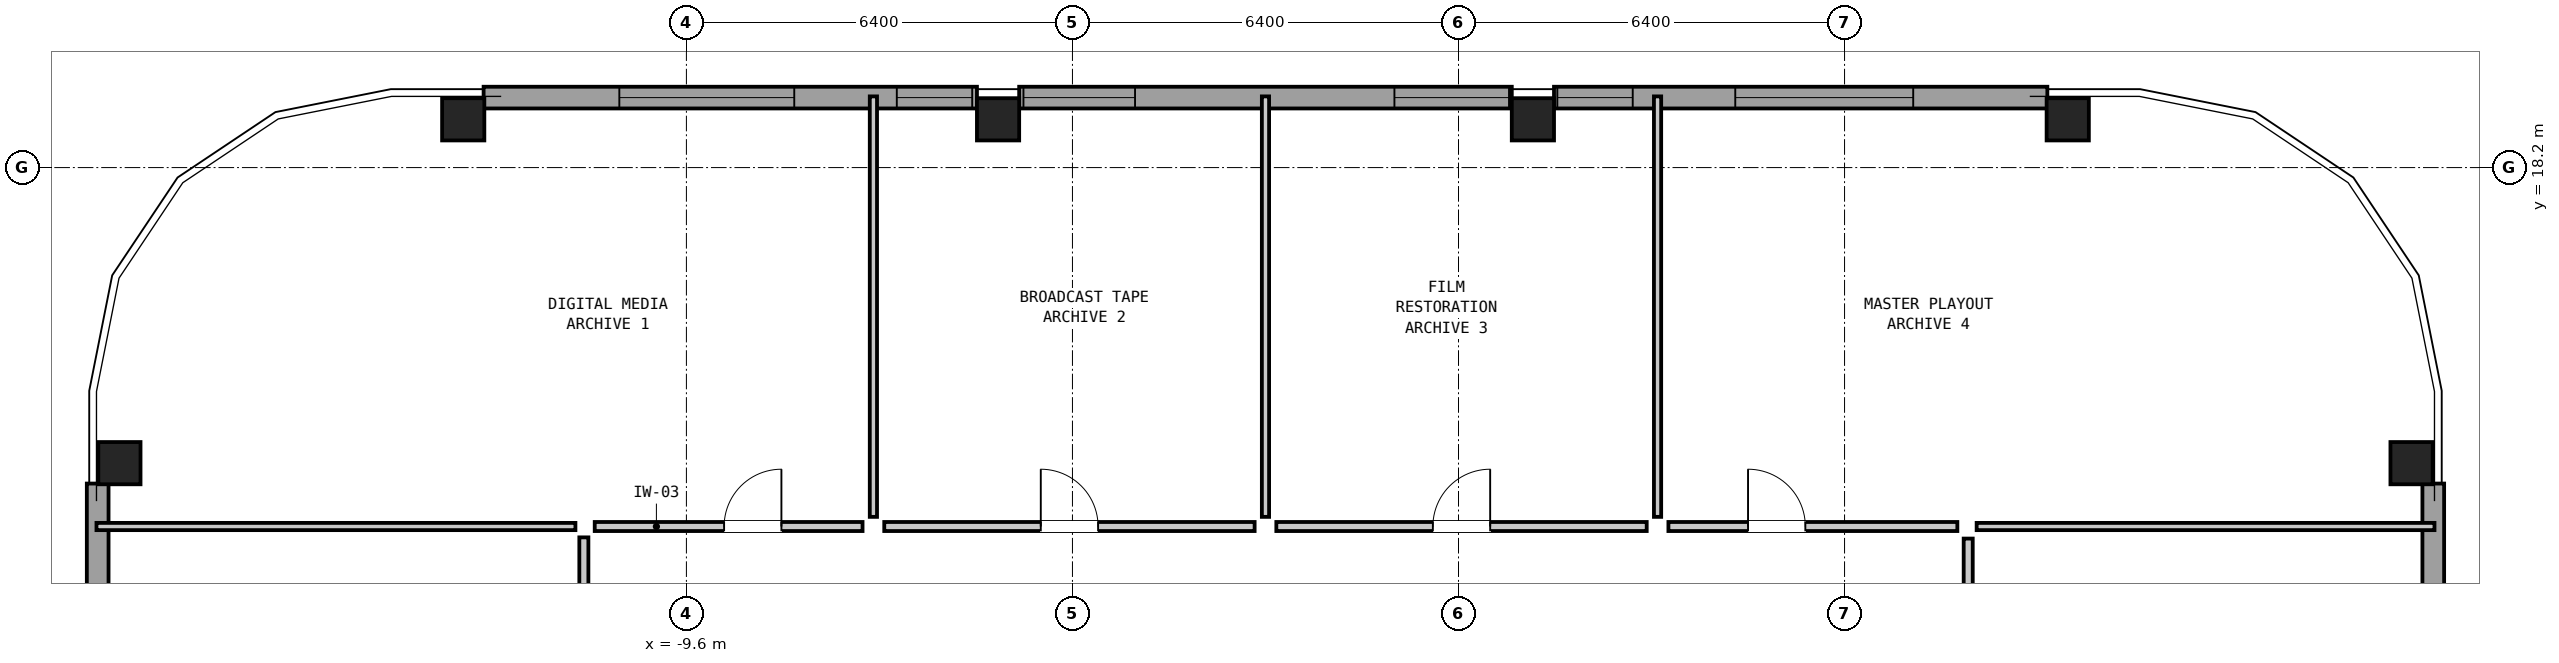
"""IFC4 building model, lengths in metres.
Left out: names, types, materials, properties, quantities, classifications, styles, units other than length and angle.
Written with IfcOpenShell. Run it as: python <this file> out.ifc"""

import sys

from ifc_helpers import new_model, si_unit, direction, frame, frame_2d, origin, origin_2d, place, context, subcontext, project, spatial, rectangle, hollow_rectangle, extrude, element, fill, save


model = new_model("IFC4")
c1 = context("Model", 3, precision=1e-05, world=origin(), true_north=direction((0.0, 1.0)))
c2 = subcontext(c1, "Body", "Model", "MODEL_VIEW")
j1 = project(units=[si_unit("LENGTHUNIT", "METRE"), si_unit("PLANEANGLEUNIT", "RADIAN")], contexts=[c1])
p1 = place(None, origin())
s1 = spatial("IfcSite", under=j1, at=p1, CompositionType="ELEMENT")
p2 = place(p1, origin())
s2 = spatial("IfcBuilding", under=s1, at=p2, CompositionType="ELEMENT")
p3 = place(p2, frame((0.0, 0.0, 217.8)))
s3 = spatial("IfcBuildingStorey", under=s2, at=p3, CompositionType="ELEMENT", Elevation=217.8)
for number, where, z_axis, x_axis in (
    (1, (19.0, 13.3, 0.0), (0.0, 0.0, 1.0), (0.0, 1.0, 0.0)),
    (2, (13.3, 19.0, 0.0), (0.0, 0.0, 1.0), (1.0, 0.0, 0.0)),
    (3, (4.433, 19.0, 0.0), (0.0, 0.0, 1.0), (1.0, 0.0, 0.0)),
    (4, (-4.433, 19.0, 0.0), (0.0, 0.0, 1.0), (1.0, 0.0, 0.0)),
    (5, (-13.3, 19.0, 0.0), (0.0, 0.0, 1.0), (1.0, 0.0, 0.0)),
    (6, (-19.0, 13.3, 0.0), (0.0, 0.0, 1.0), (0.0, 1.0, 0.0)),
):
    element("IfcColumn", number, at=place(p3, frame(where, z_axis=z_axis, x_axis=x_axis)), inside=s3, PredefinedType="COLUMN", context=c2, shape_type="SweptSolid", body=[
        extrude(hollow_rectangle(XDim=0.7, YDim=0.7, WallThickness=0.045, at=origin_2d()), origin(), (0.0, 0.0, 1.0), 3.05),
    ])
p4 = place(p3, frame((19.36, 12.962, 0.0), z_axis=(0.0, 0.0, 1.0), x_axis=(0.0, -1.0, 0.0)))
e7 = element("IfcWall", 7, at=p4, inside=s3, PredefinedType="SOLIDWALL", context=c2, shape_type="SweptSolid", body=[
    extrude(rectangle(XDim=8.179, YDim=0.36, at=frame_2d((4.089, 0.0))), origin(), (0.0, 0.0, 1.0), 2.374),
])
p5 = place(p4, frame((2.15, 0.0, 1.4)))
e8 = element("IfcOpeningElement", 8, at=p5, cuts=e7, PredefinedType="OPENING", context=c2, shape_type="SweptSolid", body=[
    extrude(rectangle(XDim=3.1, YDim=0.8, at=frame_2d((1.55, 0.4))), frame((0.0, 0.192, 0.0), z_axis=(0.0, -1.0, 0.0), x_axis=(1.0, 0.0, 0.0)), (0.0, 0.0, 1.0), 0.384),
])
p6 = place(p4, frame((5.95, 0.0, 0.2)))
e9 = element("IfcOpeningElement", 9, at=p6, cuts=e7, PredefinedType="OPENING", context=c2, shape_type="SweptSolid", body=[
    extrude(rectangle(XDim=2.15, YDim=1.05, at=frame_2d((1.075, 0.525))), frame((0.0, 0.192, 0.0), z_axis=(0.0, -1.0, 0.0), x_axis=(1.0, 0.0, 0.0)), (0.0, 0.0, 1.0), 0.384),
])
p7 = place(p3, frame((-12.962, 19.36, 0.0), z_axis=(0.0, 0.0, 1.0), x_axis=(1.0, 0.0, 0.0)))
e10 = element("IfcWall", 10, at=p7, inside=s3, PredefinedType="SOLIDWALL", context=c2, shape_type="SweptSolid", body=[
    extrude(rectangle(XDim=8.179, YDim=0.36, at=frame_2d((4.089, 0.0))), origin(), (0.0, 0.0, 1.0), 2.374),
])
p8 = place(p7, frame((2.25, 0.0, 1.45)))
e11 = element("IfcOpeningElement", 11, at=p8, cuts=e10, PredefinedType="OPENING", context=c2, shape_type="SweptSolid", body=[
    extrude(rectangle(XDim=2.9, YDim=0.75, at=frame_2d((1.45, 0.375))), frame((0.0, 0.192, 0.0), z_axis=(0.0, -1.0, 0.0), x_axis=(1.0, 0.0, 0.0)), (0.0, 0.0, 1.0), 0.384),
])
p9 = place(p7, frame((6.85, 0.0, 0.2)))
e12 = element("IfcOpeningElement", 12, at=p9, cuts=e10, PredefinedType="OPENING", context=c2, shape_type="SweptSolid", body=[
    extrude(rectangle(XDim=1.25, YDim=1.4, at=frame_2d((0.625, 0.7))), frame((0.0, 0.192, 0.0), z_axis=(0.0, -1.0, 0.0), x_axis=(1.0, 0.0, 0.0)), (0.0, 0.0, 1.0), 0.384),
])
p10 = place(p3, frame((-4.083, 19.36, 0.0), z_axis=(0.0, 0.0, 1.0), x_axis=(1.0, 0.0, 0.0)))
e13 = element("IfcWall", 13, at=p10, inside=s3, PredefinedType="SOLIDWALL", context=c2, shape_type="SweptSolid", body=[
    extrude(rectangle(XDim=8.167, YDim=0.36, at=frame_2d((4.083, 0.0))), origin(), (0.0, 0.0, 1.0), 2.374),
])
p11 = place(p10, frame((0.071, 0.0, 0.2)))
e14 = element("IfcOpeningElement", 14, at=p11, cuts=e13, PredefinedType="OPENING", context=c2, shape_type="SweptSolid", body=[
    extrude(rectangle(XDim=1.85, YDim=0.9, at=frame_2d((0.925, 0.45))), frame((0.0, 0.192, 0.0), z_axis=(0.0, -1.0, 0.0), x_axis=(1.0, 0.0, 0.0)), (0.0, 0.0, 1.0), 0.384),
])
p12 = place(p10, frame((6.221, 0.0, 0.2)))
e15 = element("IfcOpeningElement", 15, at=p12, cuts=e13, PredefinedType="OPENING", context=c2, shape_type="SweptSolid", body=[
    extrude(rectangle(XDim=1.9, YDim=0.9, at=frame_2d((0.95, 0.45))), frame((0.0, 0.192, 0.0), z_axis=(0.0, -1.0, 0.0), x_axis=(1.0, 0.0, 0.0)), (0.0, 0.0, 1.0), 0.384),
])
p13 = place(p3, frame((4.783, 19.36, 0.0), z_axis=(0.0, 0.0, 1.0), x_axis=(1.0, 0.0, 0.0)))
e16 = element("IfcWall", 16, at=p13, inside=s3, PredefinedType="SOLIDWALL", context=c2, shape_type="SweptSolid", body=[
    extrude(rectangle(XDim=8.179, YDim=0.36, at=frame_2d((4.089, 0.0))), origin(), (0.0, 0.0, 1.0), 2.374),
])
p14 = place(p13, frame((0.055, 0.0, 0.2)))
e17 = element("IfcOpeningElement", 17, at=p14, cuts=e16, PredefinedType="OPENING", context=c2, shape_type="SweptSolid", body=[
    extrude(rectangle(XDim=1.25, YDim=1.4, at=frame_2d((0.625, 0.7))), frame((0.0, 0.192, 0.0), z_axis=(0.0, -1.0, 0.0), x_axis=(1.0, 0.0, 0.0)), (0.0, 0.0, 1.0), 0.384),
])
p15 = place(p13, frame((3.005, 0.0, 1.45)))
e18 = element("IfcOpeningElement", 18, at=p15, cuts=e16, PredefinedType="OPENING", context=c2, shape_type="SweptSolid", body=[
    extrude(rectangle(XDim=2.95, YDim=0.75, at=frame_2d((1.475, 0.375))), frame((0.0, 0.192, 0.0), z_axis=(0.0, -1.0, 0.0), x_axis=(1.0, 0.0, 0.0)), (0.0, 0.0, 1.0), 0.384),
])
p16 = place(p3, frame((-19.36, 4.783, 0.0), z_axis=(0.0, 0.0, 1.0), x_axis=(0.0, 1.0, 0.0)))
e19 = element("IfcWall", 19, at=p16, inside=s3, PredefinedType="SOLIDWALL", context=c2, shape_type="SweptSolid", body=[
    extrude(rectangle(XDim=8.179, YDim=0.36, at=frame_2d((4.089, 0.0))), origin(), (0.0, 0.0, 1.0), 2.374),
])
p17 = place(p16, frame((0.055, 0.0, 0.2)))
e20 = element("IfcOpeningElement", 20, at=p17, cuts=e19, PredefinedType="OPENING", context=c2, shape_type="SweptSolid", body=[
    extrude(rectangle(XDim=2.15, YDim=1.05, at=frame_2d((1.075, 0.525))), frame((0.0, 0.192, 0.0), z_axis=(0.0, -1.0, 0.0), x_axis=(1.0, 0.0, 0.0)), (0.0, 0.0, 1.0), 0.384),
])
p18 = place(p16, frame((2.955, 0.0, 1.4)))
e21 = element("IfcOpeningElement", 21, at=p18, cuts=e19, PredefinedType="OPENING", context=c2, shape_type="SweptSolid", body=[
    extrude(rectangle(XDim=3.1, YDim=0.8, at=frame_2d((1.55, 0.4))), frame((0.0, 0.192, 0.0), z_axis=(0.0, -1.0, 0.0), x_axis=(1.0, 0.0, 0.0)), (0.0, 0.0, 1.0), 0.384),
])
p19 = place(p3, frame((-19.38, 12.25, 0.0), z_axis=(0.0, 0.0, 1.0), x_axis=(1.0, 0.0, 0.0)))
e22 = element("IfcWall", 22, at=p19, inside=s3, PredefinedType="PARTITIONING", context=c2, shape_type="SweptSolid", body=[
    extrude(rectangle(XDim=7.94, YDim=0.12, at=frame_2d((3.97, 0.0))), origin(), (0.0, 0.0, 1.0), 2.86),
])
p20 = place(p3, frame((11.79, 12.25, 0.0), z_axis=(0.0, 0.0, 1.0), x_axis=(1.0, 0.0, 0.0)))
e23 = element("IfcWall", 23, at=p20, inside=s3, PredefinedType="PARTITIONING", context=c2, shape_type="SweptSolid", body=[
    extrude(rectangle(XDim=7.59, YDim=0.12, at=frame_2d((3.795, 0.0))), origin(), (0.0, 0.0, 1.0), 2.86),
])
for number, where, z_axis, x_axis in (
    (24, (-6.5, 12.41, 0.0), (0.0, 0.0, 1.0), (0.0, 1.0, 0.0)),
    (25, (0.0, 12.41, 0.0), (0.0, 0.0, 1.0), (0.0, 1.0, 0.0)),
    (26, (6.5, 12.41, 0.0), (0.0, 0.0, 1.0), (0.0, 1.0, 0.0)),
):
    element("IfcWall", number, at=place(p3, frame(where, z_axis=z_axis, x_axis=x_axis)), inside=s3, PredefinedType="PARTITIONING", context=c2, shape_type="SweptSolid", body=[
        extrude(rectangle(XDim=6.97, YDim=0.12, at=frame_2d((3.485, 0.0))), origin(), (0.0, 0.0, 1.0), 2.381),
    ])
p21 = place(p3, frame((-11.12, 12.25, 0.0), z_axis=(0.0, 0.0, 1.0), x_axis=(1.0, 0.0, 0.0)))
e27 = element("IfcWall", 27, at=p21, inside=s3, PredefinedType="PARTITIONING", context=c2, shape_type="SweptSolid", body=[
    extrude(rectangle(XDim=4.44, YDim=0.15, at=frame_2d((2.22, 0.0))), origin(), (0.0, 0.0, 1.0), 2.86),
])
p22 = place(p21, frame((2.145, 0.0, 0.0)))
e28 = element("IfcOpeningElement", 28, at=p22, cuts=e27, PredefinedType="OPENING", context=c2, shape_type="SweptSolid", body=[
    extrude(rectangle(XDim=0.95, YDim=2.1, at=frame_2d((0.475, 1.05))), frame((0.0, 0.087, 0.0), z_axis=(0.0, -1.0, 0.0), x_axis=(1.0, 0.0, 0.0)), (0.0, 0.0, 1.0), 0.174),
])
p23 = place(p3, frame((-6.32, 12.25, 0.0), z_axis=(0.0, 0.0, 1.0), x_axis=(1.0, 0.0, 0.0)))
e29 = element("IfcWall", 29, at=p23, inside=s3, PredefinedType="PARTITIONING", context=c2, shape_type="SweptSolid", body=[
    extrude(rectangle(XDim=6.14, YDim=0.15, at=frame_2d((3.07, 0.0))), origin(), (0.0, 0.0, 1.0), 2.86),
])
p24 = place(p23, frame((2.595, 0.0, 0.0)))
e30 = element("IfcOpeningElement", 30, at=p24, cuts=e29, PredefinedType="OPENING", context=c2, shape_type="SweptSolid", body=[
    extrude(rectangle(XDim=0.95, YDim=2.1, at=frame_2d((0.475, 1.05))), frame((0.0, 0.087, 0.0), z_axis=(0.0, -1.0, 0.0), x_axis=(1.0, 0.0, 0.0)), (0.0, 0.0, 1.0), 0.174),
])
p25 = place(p3, frame((0.18, 12.25, 0.0), z_axis=(0.0, 0.0, 1.0), x_axis=(1.0, 0.0, 0.0)))
e31 = element("IfcWall", 31, at=p25, inside=s3, PredefinedType="PARTITIONING", context=c2, shape_type="SweptSolid", body=[
    extrude(rectangle(XDim=6.14, YDim=0.15, at=frame_2d((3.07, 0.0))), origin(), (0.0, 0.0, 1.0), 2.86),
])
p26 = place(p25, frame((2.595, 0.0, 0.0)))
e32 = element("IfcOpeningElement", 32, at=p26, cuts=e31, PredefinedType="OPENING", context=c2, shape_type="SweptSolid", body=[
    extrude(rectangle(XDim=0.95, YDim=2.1, at=frame_2d((0.475, 1.05))), frame((0.0, 0.087, 0.0), z_axis=(0.0, -1.0, 0.0), x_axis=(1.0, 0.0, 0.0)), (0.0, 0.0, 1.0), 0.174),
])
p27 = place(p3, frame((6.68, 12.25, 0.0), z_axis=(0.0, 0.0, 1.0), x_axis=(1.0, 0.0, 0.0)))
e33 = element("IfcWall", 33, at=p27, inside=s3, PredefinedType="PARTITIONING", context=c2, shape_type="SweptSolid", body=[
    extrude(rectangle(XDim=4.79, YDim=0.15, at=frame_2d((2.395, 0.0))), origin(), (0.0, 0.0, 1.0), 2.86),
])
p28 = place(p27, frame((1.32, 0.0, 0.0)))
e34 = element("IfcOpeningElement", 34, at=p28, cuts=e33, PredefinedType="OPENING", context=c2, shape_type="SweptSolid", body=[
    extrude(rectangle(XDim=0.95, YDim=2.1, at=frame_2d((0.475, 1.05))), frame((0.0, 0.087, 0.0), z_axis=(0.0, -1.0, 0.0), x_axis=(1.0, 0.0, 0.0)), (0.0, 0.0, 1.0), 0.174),
])
p29 = place(p3, frame((-11.3, 3.68, 0.0), z_axis=(0.0, 0.0, 1.0), x_axis=(0.0, 1.0, 0.0)))
e35 = element("IfcWall", 35, at=p29, inside=s3, PredefinedType="PARTITIONING", context=c2, shape_type="SweptSolid", body=[
    extrude(rectangle(XDim=8.39, YDim=0.15, at=frame_2d((4.195, 0.0))), origin(), (0.0, 0.0, 1.0), 2.86),
])
p30 = place(p29, frame((3.72, 0.0, 0.0)))
e36 = element("IfcOpeningElement", 36, at=p30, cuts=e35, PredefinedType="OPENING", context=c2, shape_type="SweptSolid", body=[
    extrude(rectangle(XDim=0.95, YDim=2.1, at=frame_2d((0.475, 1.05))), frame((0.0, 0.087, 0.0), z_axis=(0.0, -1.0, 0.0), x_axis=(1.0, 0.0, 0.0)), (0.0, 0.0, 1.0), 0.174),
])
p31 = place(p3, frame((11.65, 3.8, 0.0), z_axis=(0.0, 0.0, 1.0), x_axis=(0.0, 1.0, 0.0)))
e37 = element("IfcWall", 37, at=p31, inside=s3, PredefinedType="PARTITIONING", context=c2, shape_type="SweptSolid", body=[
    extrude(rectangle(XDim=8.25, YDim=0.15, at=frame_2d((4.125, 0.0))), origin(), (0.0, 0.0, 1.0), 2.86),
])
p32 = place(p31, frame((3.65, 0.0, 0.0)))
e38 = element("IfcOpeningElement", 38, at=p32, cuts=e37, PredefinedType="OPENING", context=c2, shape_type="SweptSolid", body=[
    extrude(rectangle(XDim=0.95, YDim=2.1, at=frame_2d((0.475, 1.05))), frame((0.0, 0.087, 0.0), z_axis=(0.0, -1.0, 0.0), x_axis=(1.0, 0.0, 0.0)), (0.0, 0.0, 1.0), 0.174),
])
p33 = place(p8, origin())
e39 = element("IfcWindow", 39, at=p33, inside=s3, PartitioningType="SINGLE_PANEL", PredefinedType="WINDOW", context=c2, shape_type="SweptSolid", body=[
    extrude(rectangle(XDim=2.9, YDim=0.75, at=frame_2d((1.45, 0.375))), frame((0.0, 0.03, 0.0), z_axis=(0.0, -1.0, 0.0), x_axis=(1.0, 0.0, 0.0)), (0.0, 0.0, 1.0), 0.06),
])
fill(e11, e39)
p34 = place(p9, origin())
e40 = element("IfcWindow", 40, at=p34, inside=s3, PartitioningType="SINGLE_PANEL", PredefinedType="WINDOW", context=c2, shape_type="SweptSolid", body=[
    extrude(rectangle(XDim=1.25, YDim=1.4, at=frame_2d((0.625, 0.7))), frame((0.0, 0.03, 0.0), z_axis=(0.0, -1.0, 0.0), x_axis=(1.0, 0.0, 0.0)), (0.0, 0.0, 1.0), 0.06),
])
fill(e12, e40)
p35 = place(p11, origin())
e41 = element("IfcWindow", 41, at=p35, inside=s3, PartitioningType="SINGLE_PANEL", PredefinedType="WINDOW", context=c2, shape_type="SweptSolid", body=[
    extrude(rectangle(XDim=1.85, YDim=0.9, at=frame_2d((0.925, 0.45))), frame((0.0, 0.03, 0.0), z_axis=(0.0, -1.0, 0.0), x_axis=(1.0, 0.0, 0.0)), (0.0, 0.0, 1.0), 0.06),
])
fill(e14, e41)
p36 = place(p12, origin())
e42 = element("IfcWindow", 42, at=p36, inside=s3, PartitioningType="SINGLE_PANEL", PredefinedType="WINDOW", context=c2, shape_type="SweptSolid", body=[
    extrude(rectangle(XDim=1.9, YDim=0.9, at=frame_2d((0.95, 0.45))), frame((0.0, 0.03, 0.0), z_axis=(0.0, -1.0, 0.0), x_axis=(1.0, 0.0, 0.0)), (0.0, 0.0, 1.0), 0.06),
])
fill(e15, e42)
p37 = place(p14, origin())
e43 = element("IfcWindow", 43, at=p37, inside=s3, PartitioningType="SINGLE_PANEL", PredefinedType="WINDOW", context=c2, shape_type="SweptSolid", body=[
    extrude(rectangle(XDim=1.25, YDim=1.4, at=frame_2d((0.625, 0.7))), frame((0.0, 0.03, 0.0), z_axis=(0.0, -1.0, 0.0), x_axis=(1.0, 0.0, 0.0)), (0.0, 0.0, 1.0), 0.06),
])
fill(e17, e43)
p38 = place(p15, origin())
e44 = element("IfcWindow", 44, at=p38, inside=s3, PartitioningType="SINGLE_PANEL", PredefinedType="WINDOW", context=c2, shape_type="SweptSolid", body=[
    extrude(rectangle(XDim=2.95, YDim=0.75, at=frame_2d((1.475, 0.375))), frame((0.0, 0.03, 0.0), z_axis=(0.0, -1.0, 0.0), x_axis=(1.0, 0.0, 0.0)), (0.0, 0.0, 1.0), 0.06),
])
fill(e18, e44)
p39 = place(p22, origin())
e45 = element("IfcDoor", 45, at=p39, inside=s3, OperationType="SINGLE_SWING_RIGHT", PredefinedType="DOOR", context=c2, shape_type="SweptSolid", body=[
    extrude(rectangle(XDim=0.95, YDim=2.1, at=frame_2d((0.475, 1.05))), frame((0.0, 0.025, 0.0), z_axis=(0.0, -1.0, 0.0), x_axis=(1.0, 0.0, 0.0)), (0.0, 0.0, 1.0), 0.05),
])
fill(e28, e45)
p40 = place(p24, origin())
e46 = element("IfcDoor", 46, at=p40, inside=s3, OperationType="SINGLE_SWING_LEFT", PredefinedType="DOOR", context=c2, shape_type="SweptSolid", body=[
    extrude(rectangle(XDim=0.95, YDim=2.1, at=frame_2d((0.475, 1.05))), frame((0.0, 0.025, 0.0), z_axis=(0.0, -1.0, 0.0), x_axis=(1.0, 0.0, 0.0)), (0.0, 0.0, 1.0), 0.05),
])
fill(e30, e46)
p41 = place(p26, origin())
e47 = element("IfcDoor", 47, at=p41, inside=s3, OperationType="SINGLE_SWING_RIGHT", PredefinedType="DOOR", context=c2, shape_type="SweptSolid", body=[
    extrude(rectangle(XDim=0.95, YDim=2.1, at=frame_2d((0.475, 1.05))), frame((0.0, 0.025, 0.0), z_axis=(0.0, -1.0, 0.0), x_axis=(1.0, 0.0, 0.0)), (0.0, 0.0, 1.0), 0.05),
])
fill(e32, e47)
p42 = place(p28, origin())
e48 = element("IfcDoor", 48, at=p42, inside=s3, OperationType="SINGLE_SWING_LEFT", PredefinedType="DOOR", context=c2, shape_type="SweptSolid", body=[
    extrude(rectangle(XDim=0.95, YDim=2.1, at=frame_2d((0.475, 1.05))), frame((0.0, 0.025, 0.0), z_axis=(0.0, -1.0, 0.0), x_axis=(1.0, 0.0, 0.0)), (0.0, 0.0, 1.0), 0.05),
])
fill(e34, e48)
save(model, sys.argv[1])
